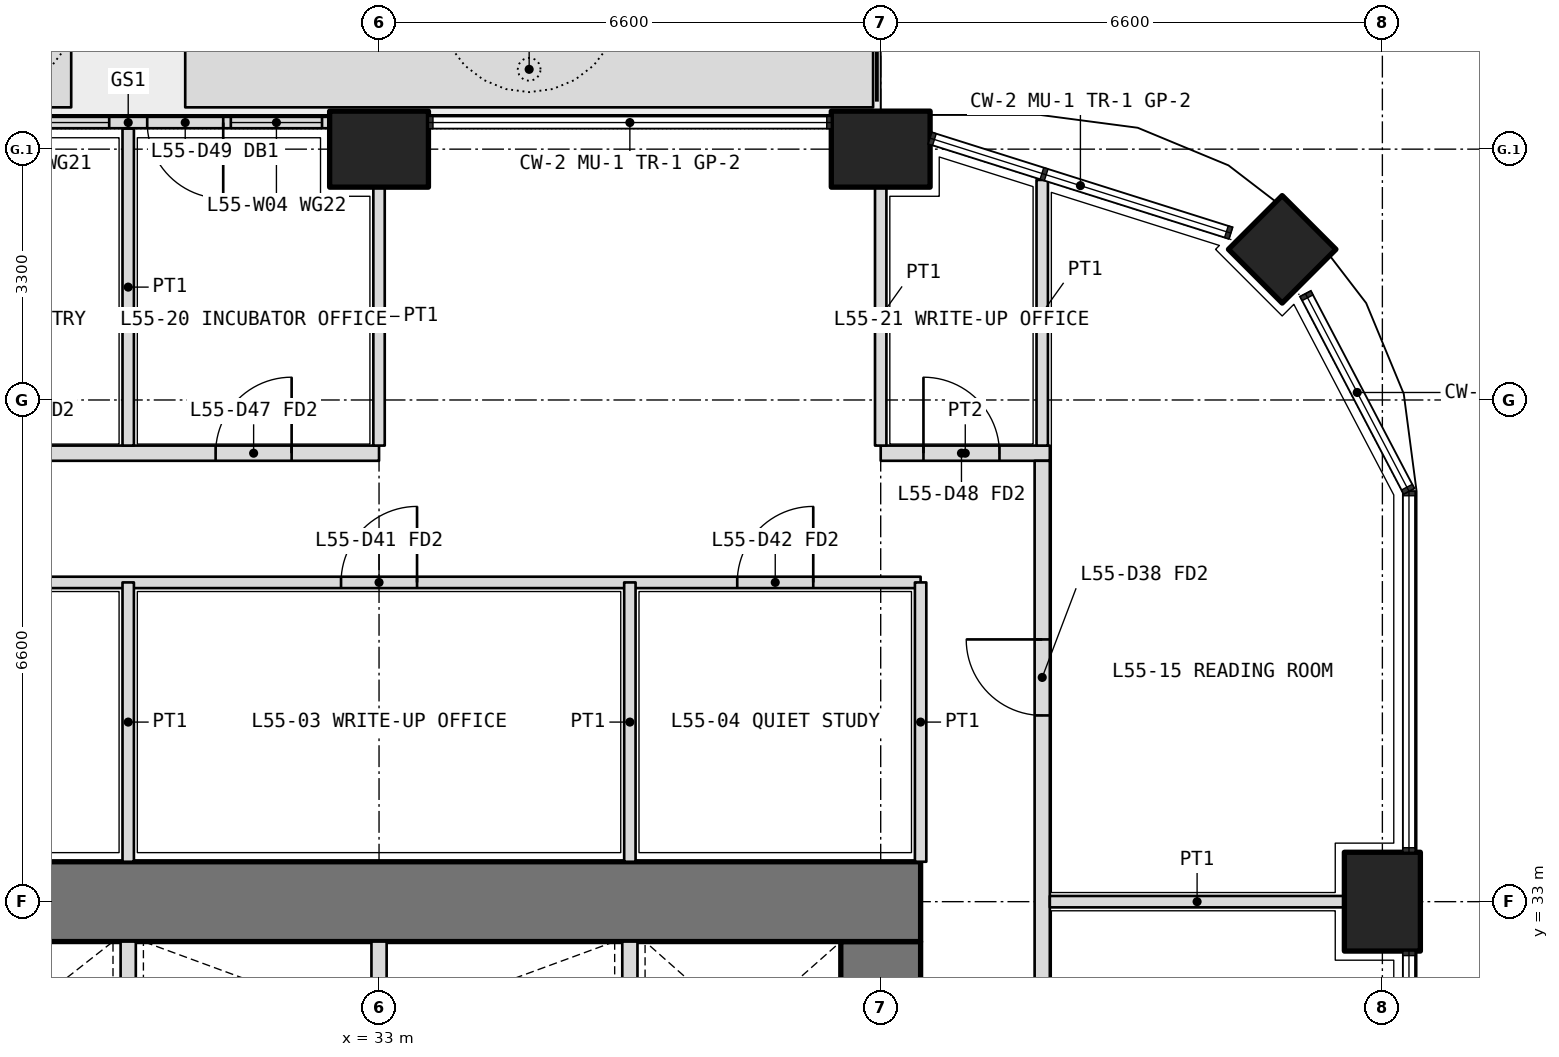
"""IFC4 building model, lengths in metres.
Left out: names, types, materials, properties, quantities, classifications, styles, units other than length and angle.
Written with IfcOpenShell. Run it as: python <this file> out.ifc"""

import sys

from ifc_helpers import new_model, si_unit, direction, frame, frame_2d, origin, origin_2d, place, context, subcontext, project, spatial, polyline, rectangle, outline, extrude, element, fill, save


model = new_model("IFC4")
c1 = context("Model", 3, precision=1e-05, world=origin(), true_north=direction((0.0, 1.0)))
c2 = subcontext(c1, "Body", "Model", "MODEL_VIEW")
j1 = project(units=[si_unit("LENGTHUNIT", "METRE"), si_unit("PLANEANGLEUNIT", "RADIAN")], contexts=[c1])
p1 = place(None, origin())
s1 = spatial("IfcSite", under=j1, at=p1, CompositionType="ELEMENT")
p2 = place(p1, origin())
s2 = spatial("IfcBuilding", under=s1, at=p2, CompositionType="ELEMENT")
p3 = place(p2, frame((0.0, 0.0, 241.8)))
s3 = spatial("IfcBuildingStorey", under=s2, at=p3, CompositionType="ELEMENT", Elevation=241.8)
p4 = place(p3, frame((44.882, 41.582, 0.0), z_axis=(0.0, 0.0, 1.0), x_axis=(0.707106781187, 0.707106781187, 0.0)))
e1 = element("IfcColumn", 1, at=p4, inside=s3, PredefinedType="COLUMN", context=c2, shape_type="SweptSolid", body=[
    extrude(rectangle(XDim=1.0, YDim=1.0, at=origin_2d()), origin(), (0.0, 0.0, 1.0), 4.2),
])
for number, where, z_axis, x_axis in (
    (2, (46.2, 33.0, 0.0), (0.0, 0.0, 1.0), (0.0, 1.0, 0.0)),
    (3, (33.0, 42.9, 0.0), (0.0, 0.0, 1.0), (1.0, 0.0, 0.0)),
    (4, (39.6, 42.9, 0.0), (0.0, 0.0, 1.0), (1.0, 0.0, 0.0)),
):
    element("IfcColumn", number, at=place(p3, frame(where, z_axis=z_axis, x_axis=x_axis)), inside=s3, PredefinedType="COLUMN", context=c2, shape_type="SweptSolid", body=[
        extrude(rectangle(XDim=1.3, YDim=1.0, at=origin_2d()), origin(), (0.0, 0.0, 1.0), 4.2),
    ])
p5 = place(p3, origin())
e5 = element("IfcWall", 5, at=p5, inside=s3, PredefinedType="USERDEFINED", context=c2, shape_type="SweptSolid", body=[
    extrude(outline(polyline([(26.5, 43.45), (28.95, 43.45), (28.95, 44.45), (26.5, 44.45), (26.5, 43.45)]), holes=[polyline([(26.65, 43.6), (28.8, 43.6), (28.8, 44.3), (26.65, 44.3), (26.65, 43.6)])]), origin(), (0.0, 0.0, 1.0), 1.05),
])
p6 = place(p3, origin())
e6 = element("IfcWall", 6, at=p6, inside=s3, PredefinedType="USERDEFINED", context=c2, shape_type="SweptSolid", body=[
    extrude(outline(polyline([(30.45, 43.45), (39.5, 43.45), (39.5, 44.45), (30.45, 44.45), (30.45, 43.45)]), holes=[polyline([(30.6, 43.6), (39.35, 43.6), (39.35, 44.3), (30.6, 44.3), (30.6, 43.6)])]), origin(), (0.0, 0.0, 1.0), 1.05),
])
p7 = place(p3, frame((32.35, 43.25, 0.0), z_axis=(0.0, 0.0, 1.0), x_axis=(-1.0, 0.0, 0.0)))
e7 = element("IfcWall", 7, at=p7, inside=s3, PredefinedType="SOLIDWALL", context=c2, shape_type="SweptSolid", body=[
    extrude(rectangle(XDim=5.3, YDim=0.15, at=frame_2d((2.65, 0.0))), origin(), (0.0, 0.0, 1.0), 2.7),
])
p8 = place(p7, frame((1.4, 0.0, 0.0)))
e8 = element("IfcOpeningElement", 8, at=p8, cuts=e7, PredefinedType="OPENING", context=c2, shape_type="SweptSolid", body=[
    extrude(rectangle(XDim=1.0, YDim=2.4, at=frame_2d((0.5, 1.2))), frame((0.0, 0.085, 0.0), z_axis=(0.0, -1.0, 0.0), x_axis=(1.0, 0.0, 0.0)), (0.0, 0.0, 1.0), 0.17),
])
p9 = place(p7, frame((0.1, 0.0, 0.1)))
e9 = element("IfcOpeningElement", 9, at=p9, cuts=e7, PredefinedType="OPENING", context=c2, shape_type="SweptSolid", body=[
    extrude(rectangle(XDim=1.2, YDim=2.3, at=frame_2d((0.6, 1.15))), frame((0.0, 0.085, 0.0), z_axis=(0.0, -1.0, 0.0), x_axis=(1.0, 0.0, 0.0)), (0.0, 0.0, 1.0), 0.17),
])
p10 = place(p7, frame((2.9, 0.0, 0.1)))
e10 = element("IfcOpeningElement", 10, at=p10, cuts=e7, PredefinedType="OPENING", context=c2, shape_type="SweptSolid", body=[
    extrude(rectangle(XDim=2.3, YDim=2.3, at=frame_2d((1.15, 1.15))), frame((0.0, 0.085, 0.0), z_axis=(0.0, -1.0, 0.0), x_axis=(1.0, 0.0, 0.0)), (0.0, 0.0, 1.0), 0.17),
])
p11 = place(p3, frame((39.6, 13.725, 0.0), z_axis=(0.0, 0.0, 1.0), x_axis=(0.0, 1.0, 0.0)))
e11 = element("IfcWall", 11, at=p11, inside=s3, PredefinedType="SHEAR", context=c2, shape_type="SweptSolid", body=[
    extrude(rectangle(XDim=18.75, YDim=1.05, at=frame_2d((9.375, 0.0))), origin(), (0.0, 0.0, 1.0), 4.2),
])
p12 = place(p11, frame((3.025, 0.0, 0.0)))
e12 = element("IfcOpeningElement", 12, at=p12, cuts=e11, PredefinedType="OPENING", context=c2, shape_type="SweptSolid", body=[
    extrude(rectangle(XDim=1.6, YDim=2.1, at=frame_2d((0.8, 1.05))), frame((0.0, 0.535, 0.0), z_axis=(0.0, -1.0, 0.0), x_axis=(1.0, 0.0, 0.0)), (0.0, 0.0, 1.0), 1.07),
])
p13 = place(p11, frame((13.825, 0.0, 0.0)))
e13 = element("IfcOpeningElement", 13, at=p13, cuts=e11, PredefinedType="OPENING", context=c2, shape_type="SweptSolid", body=[
    extrude(rectangle(XDim=1.6, YDim=2.1, at=frame_2d((0.8, 1.05))), frame((0.0, 0.535, 0.0), z_axis=(0.0, -1.0, 0.0), x_axis=(1.0, 0.0, 0.0)), (0.0, 0.0, 1.0), 1.07),
])
p14 = place(p3, frame((40.125, 33.0, 0.0), z_axis=(0.0, 0.0, 1.0), x_axis=(-1.0, 0.0, 0.0)))
e14 = element("IfcWall", 14, at=p14, inside=s3, PredefinedType="SHEAR", context=c2, shape_type="SweptSolid", body=[
    extrude(rectangle(XDim=27.45, YDim=1.05, at=frame_2d((13.725, 0.0))), origin(), (0.0, 0.0, 1.0), 4.2),
])
for number, where, z_axis, x_axis in (
    (15, (29.7, 30.2, 0.0), (0.0, 0.0, 1.0), (0.0, 1.0, 0.0)),
    (16, (33.0, 30.2, 0.0), (0.0, 0.0, 1.0), (0.0, 1.0, 0.0)),
    (17, (36.3, 30.2, 0.0), (0.0, 0.0, 1.0), (0.0, 1.0, 0.0)),
):
    element("IfcWall", number, at=place(p3, frame(where, z_axis=z_axis, x_axis=x_axis)), inside=s3, PredefinedType="PARTITIONING", context=c2, shape_type="SweptSolid", body=[
        extrude(rectangle(XDim=2.275, YDim=0.2, at=frame_2d((1.138, 0.0))), origin(), (0.0, 0.0, 1.0), 4.2),
    ])
p15 = place(p3, frame((12.675, 37.2, 0.0), z_axis=(0.0, 0.0, 1.0), x_axis=(1.0, 0.0, 0.0)))
e18 = element("IfcWall", 18, at=p15, inside=s3, PredefinedType="PARTITIONING", context=c2, shape_type="SweptSolid", body=[
    extrude(rectangle(XDim=27.45, YDim=0.15, at=frame_2d((13.725, 0.0))), origin(), (0.0, 0.0, 1.0), 3.0),
])
p16 = place(p15, frame((3.062, 0.0, 0.0)))
e19 = element("IfcOpeningElement", 19, at=p16, cuts=e18, PredefinedType="OPENING", context=c2, shape_type="SweptSolid", body=[
    extrude(rectangle(XDim=1.0, YDim=2.1, at=frame_2d((0.5, 1.05))), frame((0.0, 0.085, 0.0), z_axis=(0.0, -1.0, 0.0), x_axis=(1.0, 0.0, 0.0)), (0.0, 0.0, 1.0), 0.17),
])
p17 = place(p15, frame((11.575, 0.0, 0.0)))
e20 = element("IfcOpeningElement", 20, at=p17, cuts=e18, PredefinedType="OPENING", context=c2, shape_type="SweptSolid", body=[
    extrude(rectangle(XDim=1.0, YDim=2.1, at=frame_2d((0.5, 1.05))), frame((0.0, 0.085, 0.0), z_axis=(0.0, -1.0, 0.0), x_axis=(1.0, 0.0, 0.0)), (0.0, 0.0, 1.0), 0.17),
])
p18 = place(p15, frame((19.825, 0.0, 0.0)))
e21 = element("IfcOpeningElement", 21, at=p18, cuts=e18, PredefinedType="OPENING", context=c2, shape_type="SweptSolid", body=[
    extrude(rectangle(XDim=1.0, YDim=2.1, at=frame_2d((0.5, 1.05))), frame((0.0, 0.085, 0.0), z_axis=(0.0, -1.0, 0.0), x_axis=(1.0, 0.0, 0.0)), (0.0, 0.0, 1.0), 0.17),
])
p19 = place(p15, frame((25.038, 0.0, 0.0)))
e22 = element("IfcOpeningElement", 22, at=p19, cuts=e18, PredefinedType="OPENING", context=c2, shape_type="SweptSolid", body=[
    extrude(rectangle(XDim=1.0, YDim=2.1, at=frame_2d((0.5, 1.05))), frame((0.0, 0.085, 0.0), z_axis=(0.0, -1.0, 0.0), x_axis=(1.0, 0.0, 0.0)), (0.0, 0.0, 1.0), 0.17),
])
p20 = place(p3, frame((40.125, 33.525, 0.0), z_axis=(0.0, 0.0, 1.0), x_axis=(0.0, 1.0, 0.0)))
e23 = element("IfcWall", 23, at=p20, inside=s3, PredefinedType="PARTITIONING", context=c2, shape_type="SweptSolid", body=[
    extrude(rectangle(XDim=3.675, YDim=0.15, at=frame_2d((1.837, 0.0))), origin(), (0.0, 0.0, 1.0), 3.0),
])
for number, where, z_axis, x_axis in (
    (24, (29.7, 33.525, 0.0), (0.0, 0.0, 1.0), (0.0, 1.0, 0.0)),
    (25, (36.3, 33.525, 0.0), (0.0, 0.0, 1.0), (0.0, 1.0, 0.0)),
):
    element("IfcWall", number, at=place(p3, frame(where, z_axis=z_axis, x_axis=x_axis)), inside=s3, PredefinedType="PARTITIONING", context=c2, shape_type="SweptSolid", body=[
        extrude(rectangle(XDim=3.675, YDim=0.15, at=frame_2d((1.837, 0.0))), origin(), (0.0, 0.0, 1.0), 3.9),
    ])
p21 = place(p3, frame((10.975, 38.9, 0.0), z_axis=(0.0, 0.0, 1.0), x_axis=(1.0, 0.0, 0.0)))
e26 = element("IfcWall", 26, at=p21, inside=s3, PredefinedType="PARTITIONING", context=c2, shape_type="SweptSolid", body=[
    extrude(rectangle(XDim=22.025, YDim=0.2, at=frame_2d((11.012, 0.0))), origin(), (0.0, 0.0, 1.0), 3.0),
])
p22 = place(p21, frame((0.562, 0.0, 0.0)))
e27 = element("IfcOpeningElement", 27, at=p22, cuts=e26, PredefinedType="OPENING", context=c2, shape_type="SweptSolid", body=[
    extrude(rectangle(XDim=1.2, YDim=2.1, at=frame_2d((0.6, 1.05))), frame((0.0, 0.11, 0.0), z_axis=(0.0, -1.0, 0.0), x_axis=(1.0, 0.0, 0.0)), (0.0, 0.0, 1.0), 0.22),
])
p23 = place(p21, frame((6.675, 0.0, 0.0)))
e28 = element("IfcOpeningElement", 28, at=p23, cuts=e26, PredefinedType="OPENING", context=c2, shape_type="SweptSolid", body=[
    extrude(rectangle(XDim=1.0, YDim=2.1, at=frame_2d((0.5, 1.05))), frame((0.0, 0.11, 0.0), z_axis=(0.0, -1.0, 0.0), x_axis=(1.0, 0.0, 0.0)), (0.0, 0.0, 1.0), 0.22),
])
p24 = place(p21, frame((13.375, 0.0, 0.0)))
e29 = element("IfcOpeningElement", 29, at=p24, cuts=e26, PredefinedType="OPENING", context=c2, shape_type="SweptSolid", body=[
    extrude(rectangle(XDim=1.0, YDim=2.1, at=frame_2d((0.5, 1.05))), frame((0.0, 0.11, 0.0), z_axis=(0.0, -1.0, 0.0), x_axis=(1.0, 0.0, 0.0)), (0.0, 0.0, 1.0), 0.22),
])
p25 = place(p21, frame((16.675, 0.0, 0.0)))
e30 = element("IfcOpeningElement", 30, at=p25, cuts=e26, PredefinedType="OPENING", context=c2, shape_type="SweptSolid", body=[
    extrude(rectangle(XDim=1.0, YDim=2.1, at=frame_2d((0.5, 1.05))), frame((0.0, 0.11, 0.0), z_axis=(0.0, -1.0, 0.0), x_axis=(1.0, 0.0, 0.0)), (0.0, 0.0, 1.0), 0.22),
])
p26 = place(p21, frame((19.875, 0.0, 0.0)))
e31 = element("IfcOpeningElement", 31, at=p26, cuts=e26, PredefinedType="OPENING", context=c2, shape_type="SweptSolid", body=[
    extrude(rectangle(XDim=1.0, YDim=2.1, at=frame_2d((0.5, 1.05))), frame((0.0, 0.11, 0.0), z_axis=(0.0, -1.0, 0.0), x_axis=(1.0, 0.0, 0.0)), (0.0, 0.0, 1.0), 0.22),
])
p27 = place(p3, frame((39.6, 38.9, 0.0), z_axis=(0.0, 0.0, 1.0), x_axis=(1.0, 0.0, 0.0)))
e32 = element("IfcWall", 32, at=p27, inside=s3, PredefinedType="PARTITIONING", context=c2, shape_type="SweptSolid", body=[
    extrude(rectangle(XDim=2.225, YDim=0.2, at=frame_2d((1.112, 0.0))), origin(), (0.0, 0.0, 1.0), 3.0),
])
p28 = place(p27, frame((0.562, 0.0, 0.0)))
e33 = element("IfcOpeningElement", 33, at=p28, cuts=e32, PredefinedType="OPENING", context=c2, shape_type="SweptSolid", body=[
    extrude(rectangle(XDim=1.0, YDim=2.1, at=frame_2d((0.5, 1.05))), frame((0.0, 0.11, 0.0), z_axis=(0.0, -1.0, 0.0), x_axis=(1.0, 0.0, 0.0)), (0.0, 0.0, 1.0), 0.22),
])
p29 = place(p3, frame((41.725, 7.4, 0.0), z_axis=(0.0, 0.0, 1.0), x_axis=(0.0, 1.0, 0.0)))
e34 = element("IfcWall", 34, at=p29, inside=s3, PredefinedType="PARTITIONING", context=c2, shape_type="SweptSolid", body=[
    extrude(rectangle(XDim=31.4, YDim=0.2, at=frame_2d((15.7, 0.0))), origin(), (0.0, 0.0, 1.0), 3.0),
])
p30 = place(p29, frame((5.65, 0.0, 0.0)))
e35 = element("IfcOpeningElement", 35, at=p30, cuts=e34, PredefinedType="OPENING", context=c2, shape_type="SweptSolid", body=[
    extrude(rectangle(XDim=1.0, YDim=2.1, at=frame_2d((0.5, 1.05))), frame((0.0, 0.11, 0.0), z_axis=(0.0, -1.0, 0.0), x_axis=(1.0, 0.0, 0.0)), (0.0, 0.0, 1.0), 0.22),
])
p31 = place(p29, frame((13.4, 0.0, 0.0)))
e36 = element("IfcOpeningElement", 36, at=p31, cuts=e34, PredefinedType="OPENING", context=c2, shape_type="SweptSolid", body=[
    extrude(rectangle(XDim=1.0, YDim=2.1, at=frame_2d((0.5, 1.05))), frame((0.0, 0.11, 0.0), z_axis=(0.0, -1.0, 0.0), x_axis=(1.0, 0.0, 0.0)), (0.0, 0.0, 1.0), 0.22),
])
p32 = place(p29, frame((16.75, 0.0, 0.0)))
e37 = element("IfcOpeningElement", 37, at=p32, cuts=e34, PredefinedType="OPENING", context=c2, shape_type="SweptSolid", body=[
    extrude(rectangle(XDim=0.9, YDim=2.1, at=frame_2d((0.45, 1.05))), frame((0.0, 0.11, 0.0), z_axis=(0.0, -1.0, 0.0), x_axis=(1.0, 0.0, 0.0)), (0.0, 0.0, 1.0), 0.22),
])
p33 = place(p29, frame((21.8, 0.0, 0.0)))
e38 = element("IfcOpeningElement", 38, at=p33, cuts=e34, PredefinedType="OPENING", context=c2, shape_type="SweptSolid", body=[
    extrude(rectangle(XDim=1.0, YDim=2.1, at=frame_2d((0.5, 1.05))), frame((0.0, 0.11, 0.0), z_axis=(0.0, -1.0, 0.0), x_axis=(1.0, 0.0, 0.0)), (0.0, 0.0, 1.0), 0.22),
])
p34 = place(p29, frame((28.05, 0.0, 0.0)))
e39 = element("IfcOpeningElement", 39, at=p34, cuts=e34, PredefinedType="OPENING", context=c2, shape_type="SweptSolid", body=[
    extrude(rectangle(XDim=1.0, YDim=2.1, at=frame_2d((0.5, 1.05))), frame((0.0, 0.11, 0.0), z_axis=(0.0, -1.0, 0.0), x_axis=(1.0, 0.0, 0.0)), (0.0, 0.0, 1.0), 0.22),
])
p35 = place(p3, frame((41.725, 42.495, 0.0), z_axis=(0.0, 0.0, 1.0), x_axis=(0.0, -1.0, 0.0)))
e40 = element("IfcWall", 40, at=p35, inside=s3, PredefinedType="PARTITIONING", context=c2, shape_type="SweptSolid", body=[
    extrude(rectangle(XDim=3.495, YDim=0.15, at=frame_2d((1.748, 0.0))), origin(), (0.0, 0.0, 1.0), 2.7),
])
p36 = place(p3, frame((45.7, 33.0, 0.0), z_axis=(0.0, 0.0, 1.0), x_axis=(-1.0, 0.0, 0.0)))
e41 = element("IfcWall", 41, at=p36, inside=s3, PredefinedType="PARTITIONING", context=c2, shape_type="SweptSolid", body=[
    extrude(rectangle(XDim=3.875, YDim=0.15, at=frame_2d((1.938, 0.0))), origin(), (0.0, 0.0, 1.0), 3.0),
])
p37 = place(p3, frame((29.7, 43.17, 0.0), z_axis=(0.0, 0.0, 1.0), x_axis=(0.0, -1.0, 0.0)))
e42 = element("IfcWall", 42, at=p37, inside=s3, PredefinedType="PARTITIONING", context=c2, shape_type="SweptSolid", body=[
    extrude(rectangle(XDim=4.17, YDim=0.15, at=frame_2d((2.085, 0.0))), origin(), (0.0, 0.0, 1.0), 2.7),
])
for number, where, z_axis, x_axis in (
    (43, (33.0, 42.4, 0.0), (0.0, 0.0, 1.0), (0.0, -1.0, 0.0)),
    (44, (39.6, 42.4, 0.0), (0.0, 0.0, 1.0), (0.0, -1.0, 0.0)),
):
    element("IfcWall", number, at=place(p3, frame(where, z_axis=z_axis, x_axis=x_axis)), inside=s3, PredefinedType="PARTITIONING", context=c2, shape_type="SweptSolid", body=[
        extrude(rectangle(XDim=3.4, YDim=0.15, at=frame_2d((1.7, 0.0))), origin(), (0.0, 0.0, 1.0), 3.0),
    ])
p38 = place(p8, origin())
e45 = element("IfcDoor", 45, at=p38, inside=s3, OperationType="SINGLE_SWING_LEFT", PredefinedType="DOOR", context=c2, shape_type="SweptSolid", body=[
    extrude(rectangle(XDim=1.0, YDim=2.4, at=frame_2d((0.5, 1.2))), frame((0.0, 0.025, 0.0), z_axis=(0.0, -1.0, 0.0), x_axis=(1.0, 0.0, 0.0)), (0.0, 0.0, 1.0), 0.05),
])
fill(e8, e45)
p39 = place(p9, origin())
e46 = element("IfcWindow", 46, at=p39, inside=s3, PartitioningType="SINGLE_PANEL", PredefinedType="WINDOW", context=c2, shape_type="SweptSolid", body=[
    extrude(rectangle(XDim=1.2, YDim=2.3, at=frame_2d((0.6, 1.15))), frame((0.0, 0.03, 0.0), z_axis=(0.0, -1.0, 0.0), x_axis=(1.0, 0.0, 0.0)), (0.0, 0.0, 1.0), 0.06),
])
fill(e9, e46)
p40 = place(p10, origin())
e47 = element("IfcWindow", 47, at=p40, inside=s3, PartitioningType="SINGLE_PANEL", PredefinedType="WINDOW", context=c2, shape_type="SweptSolid", body=[
    extrude(rectangle(XDim=2.3, YDim=2.3, at=frame_2d((1.15, 1.15))), frame((0.0, 0.03, 0.0), z_axis=(0.0, -1.0, 0.0), x_axis=(1.0, 0.0, 0.0)), (0.0, 0.0, 1.0), 0.06),
])
fill(e10, e47)
p41 = place(p18, origin())
e48 = element("IfcDoor", 48, at=p41, inside=s3, OperationType="SINGLE_SWING_RIGHT", PredefinedType="DOOR", context=c2, shape_type="SweptSolid", body=[
    extrude(rectangle(XDim=1.0, YDim=2.1, at=frame_2d((0.5, 1.05))), frame((0.0, 0.025, 0.0), z_axis=(0.0, -1.0, 0.0), x_axis=(1.0, 0.0, 0.0)), (0.0, 0.0, 1.0), 0.05),
])
fill(e21, e48)
p42 = place(p19, origin())
e49 = element("IfcDoor", 49, at=p42, inside=s3, OperationType="SINGLE_SWING_RIGHT", PredefinedType="DOOR", context=c2, shape_type="SweptSolid", body=[
    extrude(rectangle(XDim=1.0, YDim=2.1, at=frame_2d((0.5, 1.05))), frame((0.0, 0.025, 0.0), z_axis=(0.0, -1.0, 0.0), x_axis=(1.0, 0.0, 0.0)), (0.0, 0.0, 1.0), 0.05),
])
fill(e22, e49)
p43 = place(p34, origin())
e50 = element("IfcDoor", 50, at=p43, inside=s3, OperationType="SINGLE_SWING_RIGHT", PredefinedType="DOOR", context=c2, shape_type="SweptSolid", body=[
    extrude(rectangle(XDim=1.0, YDim=2.1, at=frame_2d((0.5, 1.05))), frame((0.0, 0.025, 0.0), z_axis=(0.0, -1.0, 0.0), x_axis=(1.0, 0.0, 0.0)), (0.0, 0.0, 1.0), 0.05),
])
fill(e39, e50)
p44 = place(p26, origin())
e51 = element("IfcDoor", 51, at=p44, inside=s3, OperationType="SINGLE_SWING_RIGHT", PredefinedType="DOOR", context=c2, shape_type="SweptSolid", body=[
    extrude(rectangle(XDim=1.0, YDim=2.1, at=frame_2d((0.5, 1.05))), frame((0.0, 0.025, 0.0), z_axis=(0.0, -1.0, 0.0), x_axis=(1.0, 0.0, 0.0)), (0.0, 0.0, 1.0), 0.05),
])
fill(e31, e51)
p45 = place(p28, origin())
e52 = element("IfcDoor", 52, at=p45, inside=s3, OperationType="SINGLE_SWING_LEFT", PredefinedType="DOOR", context=c2, shape_type="SweptSolid", body=[
    extrude(rectangle(XDim=1.0, YDim=2.1, at=frame_2d((0.5, 1.05))), frame((0.0, 0.025, 0.0), z_axis=(0.0, -1.0, 0.0), x_axis=(1.0, 0.0, 0.0)), (0.0, 0.0, 1.0), 0.05),
])
fill(e33, e52)
save(model, sys.argv[1])
